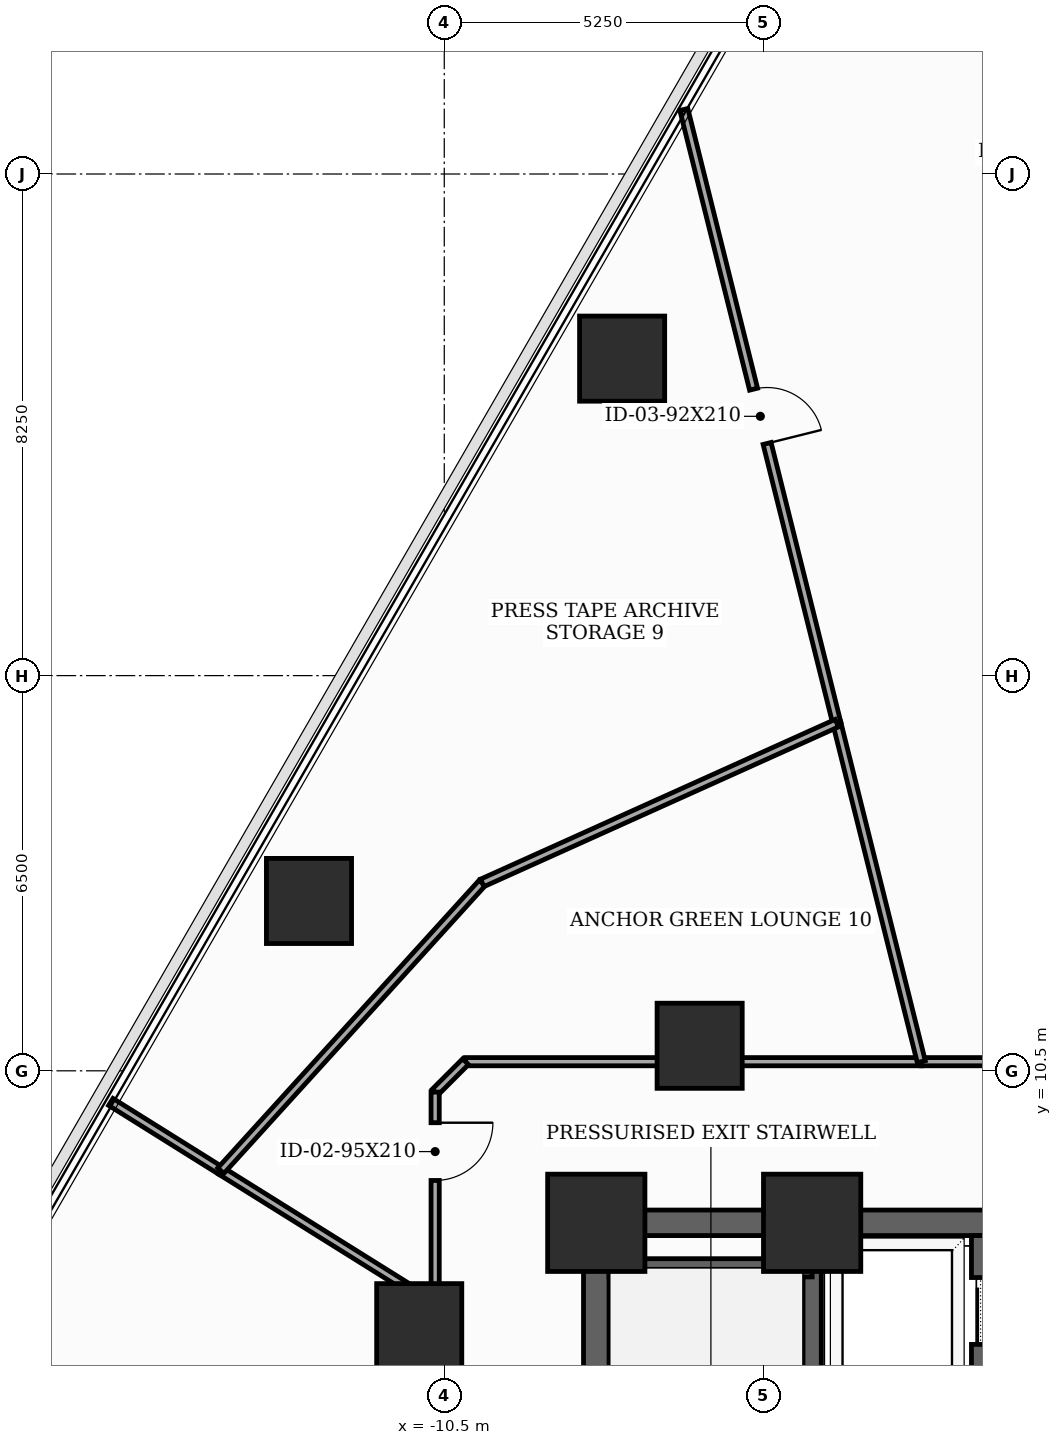
"""IFC4 building model, lengths in metres.
Left out: names, types, materials, properties, quantities, classifications, styles, units other than length and angle.
Written with IfcOpenShell. Run it as: python <this file> out.ifc"""

import sys

from ifc_helpers import new_model, si_unit, direction, frame, frame_2d, origin, origin_2d, place, context, subcontext, project, spatial, rectangle, extrude, element, fill, save


model = new_model("IFC4")
c1 = context("Model", 3, precision=1e-05, world=origin(), true_north=direction((0.0, 1.0)))
c2 = subcontext(c1, "Body", "Model", "MODEL_VIEW")
j1 = project(units=[si_unit("LENGTHUNIT", "METRE"), si_unit("PLANEANGLEUNIT", "RADIAN")], contexts=[c1])
p1 = place(None, origin())
s1 = spatial("IfcSite", under=j1, at=p1, CompositionType="ELEMENT")
p2 = place(p1, origin())
s2 = spatial("IfcBuilding", under=s1, at=p2, CompositionType="ELEMENT")
p3 = place(p2, frame((0.0, 0.0, 29.7)))
s3 = spatial("IfcBuildingStorey", under=s2, at=p3, CompositionType="ELEMENT", Elevation=29.7)
for number, where, z_axis, x_axis in (
    (1, (-4.45, 8.0, 0.0), (0.0, 0.0, 1.0), (1.0, 0.0, 0.0)),
    (2, (-8.0, 8.0, 0.0), (0.0, 0.0, 1.0), (1.0, 0.0, 0.0)),
):
    element("IfcColumn", number, at=place(p3, frame(where, z_axis=z_axis, x_axis=x_axis)), inside=s3, PredefinedType="COLUMN", context=c2, shape_type="SweptSolid", body=[
        extrude(rectangle(XDim=1.6, YDim=1.6, at=origin_2d()), origin(), (0.0, 0.0, 1.0), 3.7),
    ])
for number, where, z_axis, x_axis in (
    (3, (-6.3, 10.912, 0.0), (0.0, 0.0, 1.0), (1.0, 0.0, 0.0)),
    (4, (-10.912, 6.3, 0.0), (0.0, 0.0, 1.0), (1.0, 0.0, 0.0)),
    (5, (-7.575, 22.213, 0.0), (0.0, 0.0, 1.0), (1.0, 0.0, 0.0)),
    (6, (-12.725, 13.293, 0.0), (0.0, 0.0, 1.0), (1.0, 0.0, 0.0)),
):
    element("IfcColumn", number, at=place(p3, frame(where, z_axis=z_axis, x_axis=x_axis)), inside=s3, PredefinedType="COLUMN", context=c2, shape_type="SweptSolid", body=[
        extrude(rectangle(XDim=1.4, YDim=1.4, at=origin_2d()), origin(), (0.0, 0.0, 1.0), 3.7),
    ])
p4 = place(p3, frame((-8.0, -8.0, 0.0), z_axis=(0.0, 0.0, 1.0), x_axis=(0.0, 1.0, 0.0)))
e7 = element("IfcWall", 7, at=p4, inside=s3, PredefinedType="SHEAR", context=c2, shape_type="SweptSolid", body=[
    extrude(rectangle(XDim=16.0, YDim=0.42, at=frame_2d((8.0, 0.0))), origin(), (0.0, 0.0, 1.0), 3.5),
])
p5 = place(p4, frame((1.002, 0.0, 0.0)))
e8 = element("IfcOpeningElement", 8, at=p5, cuts=e7, PredefinedType="OPENING", context=c2, shape_type="SweptSolid", body=[
    extrude(rectangle(XDim=0.85, YDim=2.02, at=frame_2d((0.425, 1.01))), frame((0.0, 0.22, 0.0), z_axis=(0.0, -1.0, 0.0), x_axis=(1.0, 0.0, 0.0)), (0.0, 0.0, 1.0), 0.44),
])
p6 = place(p4, frame((5.35, 0.0, 0.0)))
e9 = element("IfcOpeningElement", 9, at=p6, cuts=e7, PredefinedType="OPENING", context=c2, shape_type="SweptSolid", body=[
    extrude(rectangle(XDim=1.05, YDim=2.15, at=frame_2d((0.525, 1.075))), frame((0.0, 0.22, 0.0), z_axis=(0.0, -1.0, 0.0), x_axis=(1.0, 0.0, 0.0)), (0.0, 0.0, 1.0), 0.44),
])
p7 = place(p3, frame((-8.0, 8.0, 0.0), z_axis=(0.0, 0.0, 1.0), x_axis=(1.0, 0.0, 0.0)))
e10 = element("IfcWall", 10, at=p7, inside=s3, PredefinedType="SHEAR", context=c2, shape_type="SweptSolid", body=[
    extrude(rectangle(XDim=16.0, YDim=0.42, at=frame_2d((8.0, 0.0))), origin(), (0.0, 0.0, 1.0), 3.5),
])
p8 = place(p7, frame((7.1, 0.0, 0.0)))
e11 = element("IfcOpeningElement", 11, at=p8, cuts=e10, PredefinedType="OPENING", context=c2, shape_type="SweptSolid", body=[
    extrude(rectangle(XDim=1.8, YDim=2.15, at=frame_2d((0.9, 1.075))), frame((0.0, 0.22, 0.0), z_axis=(0.0, -1.0, 0.0), x_axis=(1.0, 0.0, 0.0)), (0.0, 0.0, 1.0), 0.44),
])
p9 = place(p3, frame((-4.45, -7.79, 0.0), z_axis=(0.0, 0.0, 1.0), x_axis=(0.0, 1.0, 0.0)))
e12 = element("IfcWall", 12, at=p9, inside=s3, PredefinedType="SHEAR", context=c2, shape_type="SweptSolid", body=[
    extrude(rectangle(XDim=15.58, YDim=0.3, at=frame_2d((7.79, 0.0))), origin(), (0.0, 0.0, 1.0), 3.5),
])
p10 = place(p3, frame((-7.79, 7.26, 0.0), z_axis=(0.0, 0.0, 1.0), x_axis=(1.0, 0.0, 0.0)))
e13 = element("IfcWall", 13, at=p10, inside=s3, PredefinedType="SHEAR", context=c2, shape_type="SweptSolid", body=[
    extrude(rectangle(XDim=3.34, YDim=0.3, at=frame_2d((1.67, 0.0))), origin(), (0.0, 0.0, 1.0), 3.5),
])
p11 = place(p3, frame((-1.68, -4.85, 0.0), z_axis=(0.0, 0.0, 1.0), x_axis=(0.0, 1.0, 0.0)))
e14 = element("IfcWall", 14, at=p11, inside=s3, PredefinedType="SHEAR", context=c2, shape_type="SweptSolid", body=[
    extrude(rectangle(XDim=12.64, YDim=0.3, at=frame_2d((6.32, 0.0))), origin(), (0.0, 0.0, 1.0), 3.5),
])
p12 = place(p11, frame((3.95, 0.0, 0.0)))
e15 = element("IfcOpeningElement", 15, at=p12, cuts=e14, PredefinedType="OPENING", context=c2, shape_type="SweptSolid", body=[
    extrude(rectangle(XDim=1.1, YDim=2.1, at=frame_2d((0.55, 1.05))), frame((0.0, 0.16, 0.0), z_axis=(0.0, -1.0, 0.0), x_axis=(1.0, 0.0, 0.0)), (0.0, 0.0, 1.0), 0.32),
])
p13 = place(p11, frame((6.25, 0.0, 0.0)))
e16 = element("IfcOpeningElement", 16, at=p13, cuts=e14, PredefinedType="OPENING", context=c2, shape_type="SweptSolid", body=[
    extrude(rectangle(XDim=1.1, YDim=2.1, at=frame_2d((0.55, 1.05))), frame((0.0, 0.16, 0.0), z_axis=(0.0, -1.0, 0.0), x_axis=(1.0, 0.0, 0.0)), (0.0, 0.0, 1.0), 0.32),
])
p14 = place(p11, frame((8.55, 0.0, 0.0)))
e17 = element("IfcOpeningElement", 17, at=p14, cuts=e14, PredefinedType="OPENING", context=c2, shape_type="SweptSolid", body=[
    extrude(rectangle(XDim=1.1, YDim=2.1, at=frame_2d((0.55, 1.05))), frame((0.0, 0.16, 0.0), z_axis=(0.0, -1.0, 0.0), x_axis=(1.0, 0.0, 0.0)), (0.0, 0.0, 1.0), 0.32),
])
p15 = place(p11, frame((10.85, 0.0, 0.0)))
e18 = element("IfcOpeningElement", 18, at=p15, cuts=e14, PredefinedType="OPENING", context=c2, shape_type="SweptSolid", body=[
    extrude(rectangle(XDim=1.1, YDim=2.1, at=frame_2d((0.55, 1.05))), frame((0.0, 0.16, 0.0), z_axis=(0.0, -1.0, 0.0), x_axis=(1.0, 0.0, 0.0)), (0.0, 0.0, 1.0), 0.32),
])
p16 = place(p11, frame((1.15, 0.0, 0.0)))
e19 = element("IfcOpeningElement", 19, at=p16, cuts=e14, PredefinedType="OPENING", context=c2, shape_type="SweptSolid", body=[
    extrude(rectangle(XDim=0.92, YDim=2.1, at=frame_2d((0.46, 1.05))), frame((0.0, 0.16, 0.0), z_axis=(0.0, -1.0, 0.0), x_axis=(1.0, 0.0, 0.0)), (0.0, 0.0, 1.0), 0.32),
])
p17 = place(p3, frame((1.715, 10.65, 0.0), z_axis=(0.0, 0.0, 1.0), x_axis=(-1.0, 0.0, 0.0)))
e20 = element("IfcWall", 20, at=p17, inside=s3, PredefinedType="PARTITIONING", context=c2, shape_type="SweptSolid", body=[
    extrude(rectangle(XDim=4.37, YDim=0.135, at=frame_2d((2.185, 0.0))), origin(), (0.0, 0.0, 1.0), 2.785),
])
p18 = place(p3, frame((-10.65, 6.655, 0.0), z_axis=(0.0, 0.0, 1.0), x_axis=(0.0, -1.0, 0.0)))
e21 = element("IfcWall", 21, at=p18, inside=s3, PredefinedType="PARTITIONING", context=c2, shape_type="SweptSolid", body=[
    extrude(rectangle(XDim=8.37, YDim=0.135, at=frame_2d((4.185, 0.0))), origin(), (0.0, 0.0, 1.0), 2.785),
])
p19 = place(p3, frame((-2.655, 10.65, 0.0), z_axis=(0.0, 0.0, 1.0), x_axis=(-1.0, 0.0, 0.0)))
e22 = element("IfcWall", 22, at=p19, inside=s3, PredefinedType="PARTITIONING", context=c2, shape_type="SweptSolid", body=[
    extrude(rectangle(XDim=7.495, YDim=0.135, at=frame_2d((3.748, 0.0))), origin(), (0.0, 0.0, 1.0), 2.685),
])
p20 = place(p3, frame((-10.15, 10.65, 0.0), z_axis=(0.0, 0.0, 1.0), x_axis=(-0.707106781187, -0.707106781187, 0.0)))
e23 = element("IfcWall", 23, at=p20, inside=s3, PredefinedType="PARTITIONING", context=c2, shape_type="SweptSolid", body=[
    extrude(rectangle(XDim=0.707, YDim=0.135, at=frame_2d((0.354, 0.0))), origin(), (0.0, 0.0, 1.0), 3.5),
])
p21 = place(p3, frame((-10.65, 10.15, 0.0), z_axis=(0.0, 0.0, 1.0), x_axis=(0.0, -1.0, 0.0)))
e24 = element("IfcWall", 24, at=p21, inside=s3, PredefinedType="PARTITIONING", context=c2, shape_type="SweptSolid", body=[
    extrude(rectangle(XDim=3.495, YDim=0.135, at=frame_2d((1.748, 0.0))), origin(), (0.0, 0.0, 1.0), 2.785),
])
p22 = place(p21, frame((0.504, 0.0, 0.0)))
e25 = element("IfcOpeningElement", 25, at=p22, cuts=e24, PredefinedType="OPENING", context=c2, shape_type="SweptSolid", body=[
    extrude(rectangle(XDim=0.95, YDim=2.1, at=frame_2d((0.475, 1.05))), frame((0.0, 0.077, 0.0), z_axis=(0.0, -1.0, 0.0), x_axis=(1.0, 0.0, 0.0)), (0.0, 0.0, 1.0), 0.155),
])
p23 = place(p3, frame((-6.56, 26.311, 0.0), z_axis=(0.0, 0.0, 1.0), x_axis=(0.241883926999, -0.970305192122, 0.0)))
e26 = element("IfcWall", 26, at=p23, inside=s3, PredefinedType="PARTITIONING", context=c2, shape_type="SweptSolid", body=[
    extrude(rectangle(XDim=10.402, YDim=0.135, at=frame_2d((5.201, 0.0))), origin(), (0.0, 0.0, 1.0), 2.935),
])
p24 = place(p23, frame((4.741, 0.0, 0.0)))
e27 = element("IfcOpeningElement", 27, at=p24, cuts=e26, PredefinedType="OPENING", context=c2, shape_type="SweptSolid", body=[
    extrude(rectangle(XDim=0.92, YDim=2.1, at=frame_2d((0.46, 1.05))), frame((0.0, 0.077, 0.0), z_axis=(0.0, -1.0, 0.0), x_axis=(1.0, 0.0, 0.0)), (0.0, 0.0, 1.0), 0.155),
])
p25 = place(p3, frame((-4.044, 16.218, 0.0), z_axis=(0.0, 0.0, 1.0), x_axis=(0.242025079774, -0.970269993744, 0.0)))
e28 = element("IfcWall", 28, at=p25, inside=s3, PredefinedType="PARTITIONING", context=c2, shape_type="SweptSolid", body=[
    extrude(rectangle(XDim=5.739, YDim=0.135, at=frame_2d((2.869, 0.0))), origin(), (0.0, 0.0, 1.0), 2.785),
])
p26 = place(p3, frame((-14.175, 8.857, 0.0), z_axis=(0.0, 0.0, 1.0), x_axis=(-0.847856855063, 0.530225191142, 0.0)))
e29 = element("IfcWall", 29, at=p26, inside=s3, PredefinedType="PARTITIONING", context=c2, shape_type="SweptSolid", body=[
    extrude(rectangle(XDim=2.134, YDim=0.135, at=frame_2d((1.067, 0.0))), origin(), (0.0, 0.0, 1.0), 2.935),
])
p27 = place(p3, frame((-10.65, 6.655, 0.0), z_axis=(0.0, 0.0, 1.0), x_axis=(-0.848140172493, 0.529771882798, 0.0)))
e30 = element("IfcWall", 30, at=p27, inside=s3, PredefinedType="PARTITIONING", context=c2, shape_type="SweptSolid", body=[
    extrude(rectangle(XDim=4.156, YDim=0.135, at=frame_2d((2.078, 0.0))), origin(), (0.0, 0.0, 1.0), 2.785),
])
for number, where, z_axis, x_axis in (
    (31, (-14.175, 8.857, 0.0), (0.0, 0.0, 1.0), (0.672, 0.74, 0.0)),
    (32, (-9.875, 13.591, 0.0), (0.0, 0.0, 1.0), (0.912, 0.411, 0.0)),
):
    element("IfcWall", number, at=place(p3, frame(where, z_axis=z_axis, x_axis=x_axis)), inside=s3, PredefinedType="PARTITIONING", context=c2, shape_type="SweptSolid", body=[
        extrude(rectangle(XDim=6.396, YDim=0.135, at=frame_2d((3.198, 0.0))), origin(), (0.0, 0.0, 1.0), 2.685),
    ])
p28 = place(p15, origin())
e33 = element("IfcDoor", 33, at=p28, inside=s3, OperationType="SLIDING_TO_LEFT", PredefinedType="DOOR", context=c2, shape_type="SweptSolid", body=[
    extrude(rectangle(XDim=1.1, YDim=2.1, at=frame_2d((0.55, 1.05))), frame((0.0, 0.025, 0.0), z_axis=(0.0, -1.0, 0.0), x_axis=(1.0, 0.0, 0.0)), (0.0, 0.0, 1.0), 0.05),
])
fill(e18, e33)
p29 = place(p22, origin())
e34 = element("IfcDoor", 34, at=p29, inside=s3, OperationType="SINGLE_SWING_LEFT", PredefinedType="DOOR", context=c2, shape_type="SweptSolid", body=[
    extrude(rectangle(XDim=0.95, YDim=2.1, at=frame_2d((0.475, 1.05))), frame((0.0, 0.025, 0.0), z_axis=(0.0, -1.0, 0.0), x_axis=(1.0, 0.0, 0.0)), (0.0, 0.0, 1.0), 0.05),
])
fill(e25, e34)
p30 = place(p24, origin())
e35 = element("IfcDoor", 35, at=p30, inside=s3, OperationType="SINGLE_SWING_RIGHT", PredefinedType="DOOR", context=c2, shape_type="SweptSolid", body=[
    extrude(rectangle(XDim=0.92, YDim=2.1, at=frame_2d((0.46, 1.05))), frame((0.0, 0.025, 0.0), z_axis=(0.0, -1.0, 0.0), x_axis=(1.0, 0.0, 0.0)), (0.0, 0.0, 1.0), 0.05),
])
fill(e27, e35)
save(model, sys.argv[1])
